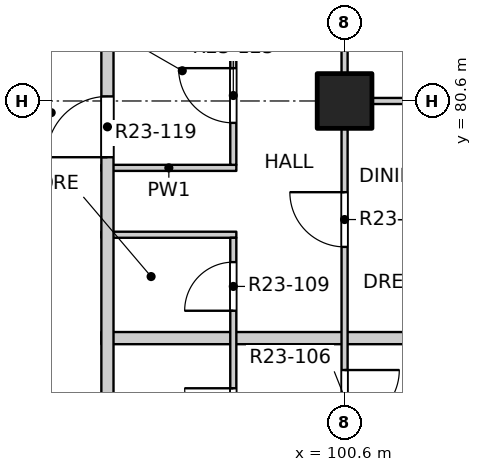
"""IFC4 building model, lengths in metres.
Left out: names, types, materials, properties, quantities, classifications, styles, units other than length and angle.
Written with IfcOpenShell. Run it as: python <this file> out.ifc"""

import sys

from ifc_helpers import new_model, si_unit, direction, frame, frame_2d, origin, origin_2d, place, context, subcontext, project, spatial, rectangle, extrude, element, fill, save


model = new_model("IFC4")
c1 = context("Model", 3, precision=1e-05, world=origin(), true_north=direction((0.0, 1.0)))
c2 = subcontext(c1, "Body", "Model", "MODEL_VIEW")
j1 = project(units=[si_unit("LENGTHUNIT", "METRE"), si_unit("PLANEANGLEUNIT", "RADIAN")], contexts=[c1])
p1 = place(None, origin())
s1 = spatial("IfcSite", under=j1, at=p1, CompositionType="ELEMENT")
p2 = place(p1, origin())
s2 = spatial("IfcBuilding", under=s1, at=p2, CompositionType="ELEMENT")
p3 = place(p2, frame((0.0, 0.0, 238.1)))
s3 = spatial("IfcBuildingStorey", under=s2, at=p3, CompositionType="ELEMENT", Elevation=238.1)
p4 = place(p3, frame((100.6, 80.6, -0.25), z_axis=(0.0, 0.0, 1.0), x_axis=(1.0, 0.0, 0.0)))
e1 = element("IfcColumn", 1, at=p4, inside=s3, PredefinedType="COLUMN", context=c2, shape_type="SweptSolid", body=[
    extrude(rectangle(XDim=0.9, YDim=0.9, at=origin_2d()), origin(), (0.0, 0.0, 1.0), 3.35),
])
p5 = place(p3, frame((96.6, 76.7, 0.0), z_axis=(0.0, 0.0, 1.0), x_axis=(1.0, 0.0, 0.0)))
e2 = element("IfcWall", 2, at=p5, inside=s3, PredefinedType="PARTITIONING", context=c2, shape_type="SweptSolid", body=[
    extrude(rectangle(XDim=11.5, YDim=0.2, at=frame_2d((5.75, 0.0))), origin(), (0.0, 0.0, 1.0), 3.1),
])
for number, where, z_axis, x_axis in (
    (3, (96.6, 78.4, 0.0), (0.0, 0.0, 1.0), (1.0, 0.0, 0.0)),
    (4, (96.6, 79.5, 0.0), (0.0, 0.0, 1.0), (1.0, 0.0, 0.0)),
):
    element("IfcWall", number, at=place(p3, frame(where, z_axis=z_axis, x_axis=x_axis)), inside=s3, PredefinedType="PARTITIONING", context=c2, shape_type="SweptSolid", body=[
        extrude(rectangle(XDim=2.22, YDim=0.1, at=frame_2d((1.11, 0.0))), origin(), (0.0, 0.0, 1.0), 3.1),
    ])
p6 = place(p3, frame((100.55, 80.6, 0.0), z_axis=(0.0, 0.0, 1.0), x_axis=(1.0, 0.0, 0.0)))
e5 = element("IfcWall", 5, at=p6, inside=s3, PredefinedType="PARTITIONING", context=c2, shape_type="SweptSolid", body=[
    extrude(rectangle(XDim=7.55, YDim=0.1, at=frame_2d((3.775, 0.0))), origin(), (0.0, 0.0, 1.0), 3.1),
])
p7 = place(p3, frame((96.7, 49.5, 0.0), z_axis=(0.0, 0.0, 1.0), x_axis=(0.0, 1.0, 0.0)))
e6 = element("IfcWall", 6, at=p7, inside=s3, PredefinedType="PARTITIONING", context=c2, shape_type="SweptSolid", body=[
    extrude(rectangle(XDim=34.9, YDim=0.2, at=frame_2d((17.45, 0.0))), origin(), (0.0, 0.0, 1.0), 3.1),
])
p8 = place(p7, frame((3.175, 0.0, 0.0)))
e7 = element("IfcOpeningElement", 7, at=p8, cuts=e6, PredefinedType="OPENING", context=c2, shape_type="SweptSolid", body=[
    extrude(rectangle(XDim=1.0, YDim=2.1, at=frame_2d((0.5, 1.05))), frame((0.0, 0.11, 0.0), z_axis=(0.0, -1.0, 0.0), x_axis=(1.0, 0.0, 0.0)), (0.0, 0.0, 1.0), 0.22),
])
p9 = place(p7, frame((14.625, 0.0, 0.0)))
e8 = element("IfcOpeningElement", 8, at=p9, cuts=e6, PredefinedType="OPENING", context=c2, shape_type="SweptSolid", body=[
    extrude(rectangle(XDim=1.0, YDim=2.1, at=frame_2d((0.5, 1.05))), frame((0.0, 0.11, 0.0), z_axis=(0.0, -1.0, 0.0), x_axis=(1.0, 0.0, 0.0)), (0.0, 0.0, 1.0), 0.22),
])
p10 = place(p7, frame((30.175, 0.0, 0.0)))
e9 = element("IfcOpeningElement", 9, at=p10, cuts=e6, PredefinedType="OPENING", context=c2, shape_type="SweptSolid", body=[
    extrude(rectangle(XDim=1.0, YDim=2.1, at=frame_2d((0.5, 1.05))), frame((0.0, 0.11, 0.0), z_axis=(0.0, -1.0, 0.0), x_axis=(1.0, 0.0, 0.0)), (0.0, 0.0, 1.0), 0.22),
])
p11 = place(p3, frame((98.77, 64.0, 0.0), z_axis=(0.0, 0.0, 1.0), x_axis=(0.0, 1.0, 0.0)))
e10 = element("IfcWall", 10, at=p11, inside=s3, PredefinedType="PARTITIONING", context=c2, shape_type="SweptSolid", body=[
    extrude(rectangle(XDim=14.35, YDim=0.1, at=frame_2d((7.175, 0.0))), origin(), (0.0, 0.0, 1.0), 3.1),
])
p12 = place(p11, frame((0.815, 0.0, 0.0)))
e11 = element("IfcOpeningElement", 11, at=p12, cuts=e10, PredefinedType="OPENING", context=c2, shape_type="SweptSolid", body=[
    extrude(rectangle(XDim=0.8, YDim=2.1, at=frame_2d((0.4, 1.05))), frame((0.0, 0.06, 0.0), z_axis=(0.0, -1.0, 0.0), x_axis=(1.0, 0.0, 0.0)), (0.0, 0.0, 1.0), 0.12),
])
p13 = place(p11, frame((3.23, 0.0, 0.0)))
e12 = element("IfcOpeningElement", 12, at=p13, cuts=e10, PredefinedType="OPENING", context=c2, shape_type="SweptSolid", body=[
    extrude(rectangle(XDim=0.9, YDim=2.1, at=frame_2d((0.45, 1.05))), frame((0.0, 0.06, 0.0), z_axis=(0.0, -1.0, 0.0), x_axis=(1.0, 0.0, 0.0)), (0.0, 0.0, 1.0), 0.12),
])
p14 = place(p11, frame((5.63, 0.0, 0.0)))
e13 = element("IfcOpeningElement", 13, at=p14, cuts=e10, PredefinedType="OPENING", context=c2, shape_type="SweptSolid", body=[
    extrude(rectangle(XDim=0.8, YDim=2.1, at=frame_2d((0.4, 1.05))), frame((0.0, 0.06, 0.0), z_axis=(0.0, -1.0, 0.0), x_axis=(1.0, 0.0, 0.0)), (0.0, 0.0, 1.0), 0.12),
])
p15 = place(p11, frame((8.265, 0.0, 0.0)))
e14 = element("IfcOpeningElement", 14, at=p15, cuts=e10, PredefinedType="OPENING", context=c2, shape_type="SweptSolid", body=[
    extrude(rectangle(XDim=0.9, YDim=2.1, at=frame_2d((0.45, 1.05))), frame((0.0, 0.06, 0.0), z_axis=(0.0, -1.0, 0.0), x_axis=(1.0, 0.0, 0.0)), (0.0, 0.0, 1.0), 0.12),
])
p16 = place(p11, frame((11.075, 0.0, 0.0)))
e15 = element("IfcOpeningElement", 15, at=p16, cuts=e10, PredefinedType="OPENING", context=c2, shape_type="SweptSolid", body=[
    extrude(rectangle(XDim=0.8, YDim=2.1, at=frame_2d((0.4, 1.05))), frame((0.0, 0.06, 0.0), z_axis=(0.0, -1.0, 0.0), x_axis=(1.0, 0.0, 0.0)), (0.0, 0.0, 1.0), 0.12),
])
p17 = place(p11, frame((13.15, 0.0, 0.0)))
e16 = element("IfcOpeningElement", 16, at=p17, cuts=e10, PredefinedType="OPENING", context=c2, shape_type="SweptSolid", body=[
    extrude(rectangle(XDim=0.8, YDim=2.1, at=frame_2d((0.4, 1.05))), frame((0.0, 0.06, 0.0), z_axis=(0.0, -1.0, 0.0), x_axis=(1.0, 0.0, 0.0)), (0.0, 0.0, 1.0), 0.12),
])
p18 = place(p3, frame((98.77, 79.55, 0.0), z_axis=(0.0, 0.0, 1.0), x_axis=(0.0, 1.0, 0.0)))
e17 = element("IfcWall", 17, at=p18, inside=s3, PredefinedType="PARTITIONING", context=c2, shape_type="SweptSolid", body=[
    extrude(rectangle(XDim=4.9, YDim=0.1, at=frame_2d((2.45, 0.0))), origin(), (0.0, 0.0, 1.0), 3.1),
])
p19 = place(p18, frame((0.69, 0.0, 0.0)))
e18 = element("IfcOpeningElement", 18, at=p19, cuts=e17, PredefinedType="OPENING", context=c2, shape_type="SweptSolid", body=[
    extrude(rectangle(XDim=0.9, YDim=2.1, at=frame_2d((0.45, 1.05))), frame((0.0, 0.06, 0.0), z_axis=(0.0, -1.0, 0.0), x_axis=(1.0, 0.0, 0.0)), (0.0, 0.0, 1.0), 0.12),
])
p20 = place(p18, frame((3.19, 0.0, 0.0)))
e19 = element("IfcOpeningElement", 19, at=p20, cuts=e17, PredefinedType="OPENING", context=c2, shape_type="SweptSolid", body=[
    extrude(rectangle(XDim=0.9, YDim=2.1, at=frame_2d((0.45, 1.05))), frame((0.0, 0.06, 0.0), z_axis=(0.0, -1.0, 0.0), x_axis=(1.0, 0.0, 0.0)), (0.0, 0.0, 1.0), 0.12),
])
p21 = place(p3, frame((100.6, 41.9, 0.0), z_axis=(0.0, 0.0, 1.0), x_axis=(0.0, 1.0, 0.0)))
e20 = element("IfcWall", 20, at=p21, inside=s3, PredefinedType="PARTITIONING", context=c2, shape_type="SweptSolid", body=[
    extrude(rectangle(XDim=46.2, YDim=0.1, at=frame_2d((23.1, 0.0))), origin(), (0.0, 0.0, 1.0), 3.1),
])
p22 = place(p21, frame((1.2, 0.0, 0.0)))
e21 = element("IfcOpeningElement", 21, at=p22, cuts=e20, PredefinedType="OPENING", context=c2, shape_type="SweptSolid", body=[
    extrude(rectangle(XDim=0.9, YDim=2.1, at=frame_2d((0.45, 1.05))), frame((0.0, 0.06, 0.0), z_axis=(0.0, -1.0, 0.0), x_axis=(1.0, 0.0, 0.0)), (0.0, 0.0, 1.0), 0.12),
])
p23 = place(p21, frame((6.025, 0.0, 0.0)))
e22 = element("IfcOpeningElement", 22, at=p23, cuts=e20, PredefinedType="OPENING", context=c2, shape_type="SweptSolid", body=[
    extrude(rectangle(XDim=0.9, YDim=2.1, at=frame_2d((0.45, 1.05))), frame((0.0, 0.06, 0.0), z_axis=(0.0, -1.0, 0.0), x_axis=(1.0, 0.0, 0.0)), (0.0, 0.0, 1.0), 0.12),
])
p24 = place(p21, frame((9.975, 0.0, 0.0)))
e23 = element("IfcOpeningElement", 23, at=p24, cuts=e20, PredefinedType="OPENING", context=c2, shape_type="SweptSolid", body=[
    extrude(rectangle(XDim=0.9, YDim=2.1, at=frame_2d((0.45, 1.05))), frame((0.0, 0.06, 0.0), z_axis=(0.0, -1.0, 0.0), x_axis=(1.0, 0.0, 0.0)), (0.0, 0.0, 1.0), 0.12),
])
p25 = place(p21, frame((12.9, 0.0, 0.0)))
e24 = element("IfcOpeningElement", 24, at=p25, cuts=e20, PredefinedType="OPENING", context=c2, shape_type="SweptSolid", body=[
    extrude(rectangle(XDim=0.9, YDim=2.1, at=frame_2d((0.45, 1.05))), frame((0.0, 0.06, 0.0), z_axis=(0.0, -1.0, 0.0), x_axis=(1.0, 0.0, 0.0)), (0.0, 0.0, 1.0), 0.12),
])
p26 = place(p21, frame((17.775, 0.0, 0.0)))
e25 = element("IfcOpeningElement", 25, at=p26, cuts=e20, PredefinedType="OPENING", context=c2, shape_type="SweptSolid", body=[
    extrude(rectangle(XDim=0.9, YDim=2.1, at=frame_2d((0.45, 1.05))), frame((0.0, 0.06, 0.0), z_axis=(0.0, -1.0, 0.0), x_axis=(1.0, 0.0, 0.0)), (0.0, 0.0, 1.0), 0.12),
])
p27 = place(p21, frame((21.625, 0.0, 0.0)))
e26 = element("IfcOpeningElement", 26, at=p27, cuts=e20, PredefinedType="OPENING", context=c2, shape_type="SweptSolid", body=[
    extrude(rectangle(XDim=0.9, YDim=2.1, at=frame_2d((0.45, 1.05))), frame((0.0, 0.06, 0.0), z_axis=(0.0, -1.0, 0.0), x_axis=(1.0, 0.0, 0.0)), (0.0, 0.0, 1.0), 0.12),
])
p28 = place(p21, frame((25.575, 0.0, 0.0)))
e27 = element("IfcOpeningElement", 27, at=p28, cuts=e20, PredefinedType="OPENING", context=c2, shape_type="SweptSolid", body=[
    extrude(rectangle(XDim=0.9, YDim=2.1, at=frame_2d((0.45, 1.05))), frame((0.0, 0.06, 0.0), z_axis=(0.0, -1.0, 0.0), x_axis=(1.0, 0.0, 0.0)), (0.0, 0.0, 1.0), 0.12),
])
p29 = place(p21, frame((28.5, 0.0, 0.0)))
e28 = element("IfcOpeningElement", 28, at=p29, cuts=e20, PredefinedType="OPENING", context=c2, shape_type="SweptSolid", body=[
    extrude(rectangle(XDim=0.9, YDim=2.1, at=frame_2d((0.45, 1.05))), frame((0.0, 0.06, 0.0), z_axis=(0.0, -1.0, 0.0), x_axis=(1.0, 0.0, 0.0)), (0.0, 0.0, 1.0), 0.12),
])
p30 = place(p21, frame((33.375, 0.0, 0.0)))
e29 = element("IfcOpeningElement", 29, at=p30, cuts=e20, PredefinedType="OPENING", context=c2, shape_type="SweptSolid", body=[
    extrude(rectangle(XDim=0.9, YDim=2.1, at=frame_2d((0.45, 1.05))), frame((0.0, 0.06, 0.0), z_axis=(0.0, -1.0, 0.0), x_axis=(1.0, 0.0, 0.0)), (0.0, 0.0, 1.0), 0.12),
])
p31 = place(p21, frame((36.3, 0.0, 0.0)))
e30 = element("IfcOpeningElement", 30, at=p31, cuts=e20, PredefinedType="OPENING", context=c2, shape_type="SweptSolid", body=[
    extrude(rectangle(XDim=0.9, YDim=2.1, at=frame_2d((0.45, 1.05))), frame((0.0, 0.06, 0.0), z_axis=(0.0, -1.0, 0.0), x_axis=(1.0, 0.0, 0.0)), (0.0, 0.0, 1.0), 0.12),
])
p32 = place(p21, frame((40.2, 0.0, 0.0)))
e31 = element("IfcOpeningElement", 31, at=p32, cuts=e20, PredefinedType="OPENING", context=c2, shape_type="SweptSolid", body=[
    extrude(rectangle(XDim=0.9, YDim=2.1, at=frame_2d((0.45, 1.05))), frame((0.0, 0.06, 0.0), z_axis=(0.0, -1.0, 0.0), x_axis=(1.0, 0.0, 0.0)), (0.0, 0.0, 1.0), 0.12),
])
p33 = place(p21, frame((44.1, 0.0, 0.0)))
e32 = element("IfcOpeningElement", 32, at=p33, cuts=e20, PredefinedType="OPENING", context=c2, shape_type="SweptSolid", body=[
    extrude(rectangle(XDim=0.9, YDim=2.1, at=frame_2d((0.45, 1.05))), frame((0.0, 0.06, 0.0), z_axis=(0.0, -1.0, 0.0), x_axis=(1.0, 0.0, 0.0)), (0.0, 0.0, 1.0), 0.12),
])
p34 = place(p16, origin())
e33 = element("IfcDoor", 33, at=p34, inside=s3, OperationType="SINGLE_SWING_RIGHT", PredefinedType="DOOR", context=c2, shape_type="SweptSolid", body=[
    extrude(rectangle(XDim=0.8, YDim=2.1, at=frame_2d((0.4, 1.05))), frame((0.0, 0.025, 0.0), z_axis=(0.0, -1.0, 0.0), x_axis=(1.0, 0.0, 0.0)), (0.0, 0.0, 1.0), 0.05),
])
fill(e15, e33)
p35 = place(p30, origin())
e34 = element("IfcDoor", 34, at=p35, inside=s3, OperationType="SINGLE_SWING_LEFT", PredefinedType="DOOR", context=c2, shape_type="SweptSolid", body=[
    extrude(rectangle(XDim=0.9, YDim=2.1, at=frame_2d((0.45, 1.05))), frame((0.0, 0.025, 0.0), z_axis=(0.0, -1.0, 0.0), x_axis=(1.0, 0.0, 0.0)), (0.0, 0.0, 1.0), 0.05),
])
fill(e29, e34)
p36 = place(p17, origin())
e35 = element("IfcDoor", 35, at=p36, inside=s3, OperationType="SINGLE_SWING_LEFT", PredefinedType="DOOR", context=c2, shape_type="SweptSolid", body=[
    extrude(rectangle(XDim=0.8, YDim=2.1, at=frame_2d((0.4, 1.05))), frame((0.0, 0.025, 0.0), z_axis=(0.0, -1.0, 0.0), x_axis=(1.0, 0.0, 0.0)), (0.0, 0.0, 1.0), 0.05),
])
fill(e16, e35)
p37 = place(p31, origin())
e36 = element("IfcDoor", 36, at=p37, inside=s3, OperationType="SINGLE_SWING_RIGHT", PredefinedType="DOOR", context=c2, shape_type="SweptSolid", body=[
    extrude(rectangle(XDim=0.9, YDim=2.1, at=frame_2d((0.45, 1.05))), frame((0.0, 0.025, 0.0), z_axis=(0.0, -1.0, 0.0), x_axis=(1.0, 0.0, 0.0)), (0.0, 0.0, 1.0), 0.05),
])
fill(e30, e36)
p38 = place(p10, origin())
e37 = element("IfcDoor", 37, at=p38, inside=s3, OperationType="SINGLE_SWING_LEFT", PredefinedType="DOOR", context=c2, shape_type="SweptSolid", body=[
    extrude(rectangle(XDim=1.0, YDim=2.1, at=frame_2d((0.5, 1.05))), frame((0.0, 0.025, 0.0), z_axis=(0.0, -1.0, 0.0), x_axis=(1.0, 0.0, 0.0)), (0.0, 0.0, 1.0), 0.05),
])
fill(e9, e37)
p39 = place(p19, origin())
e38 = element("IfcDoor", 38, at=p39, inside=s3, OperationType="SINGLE_SWING_RIGHT", PredefinedType="DOOR", context=c2, shape_type="SweptSolid", body=[
    extrude(rectangle(XDim=0.9, YDim=2.1, at=frame_2d((0.45, 1.05))), frame((0.0, 0.025, 0.0), z_axis=(0.0, -1.0, 0.0), x_axis=(1.0, 0.0, 0.0)), (0.0, 0.0, 1.0), 0.05),
])
fill(e18, e38)
save(model, sys.argv[1])
